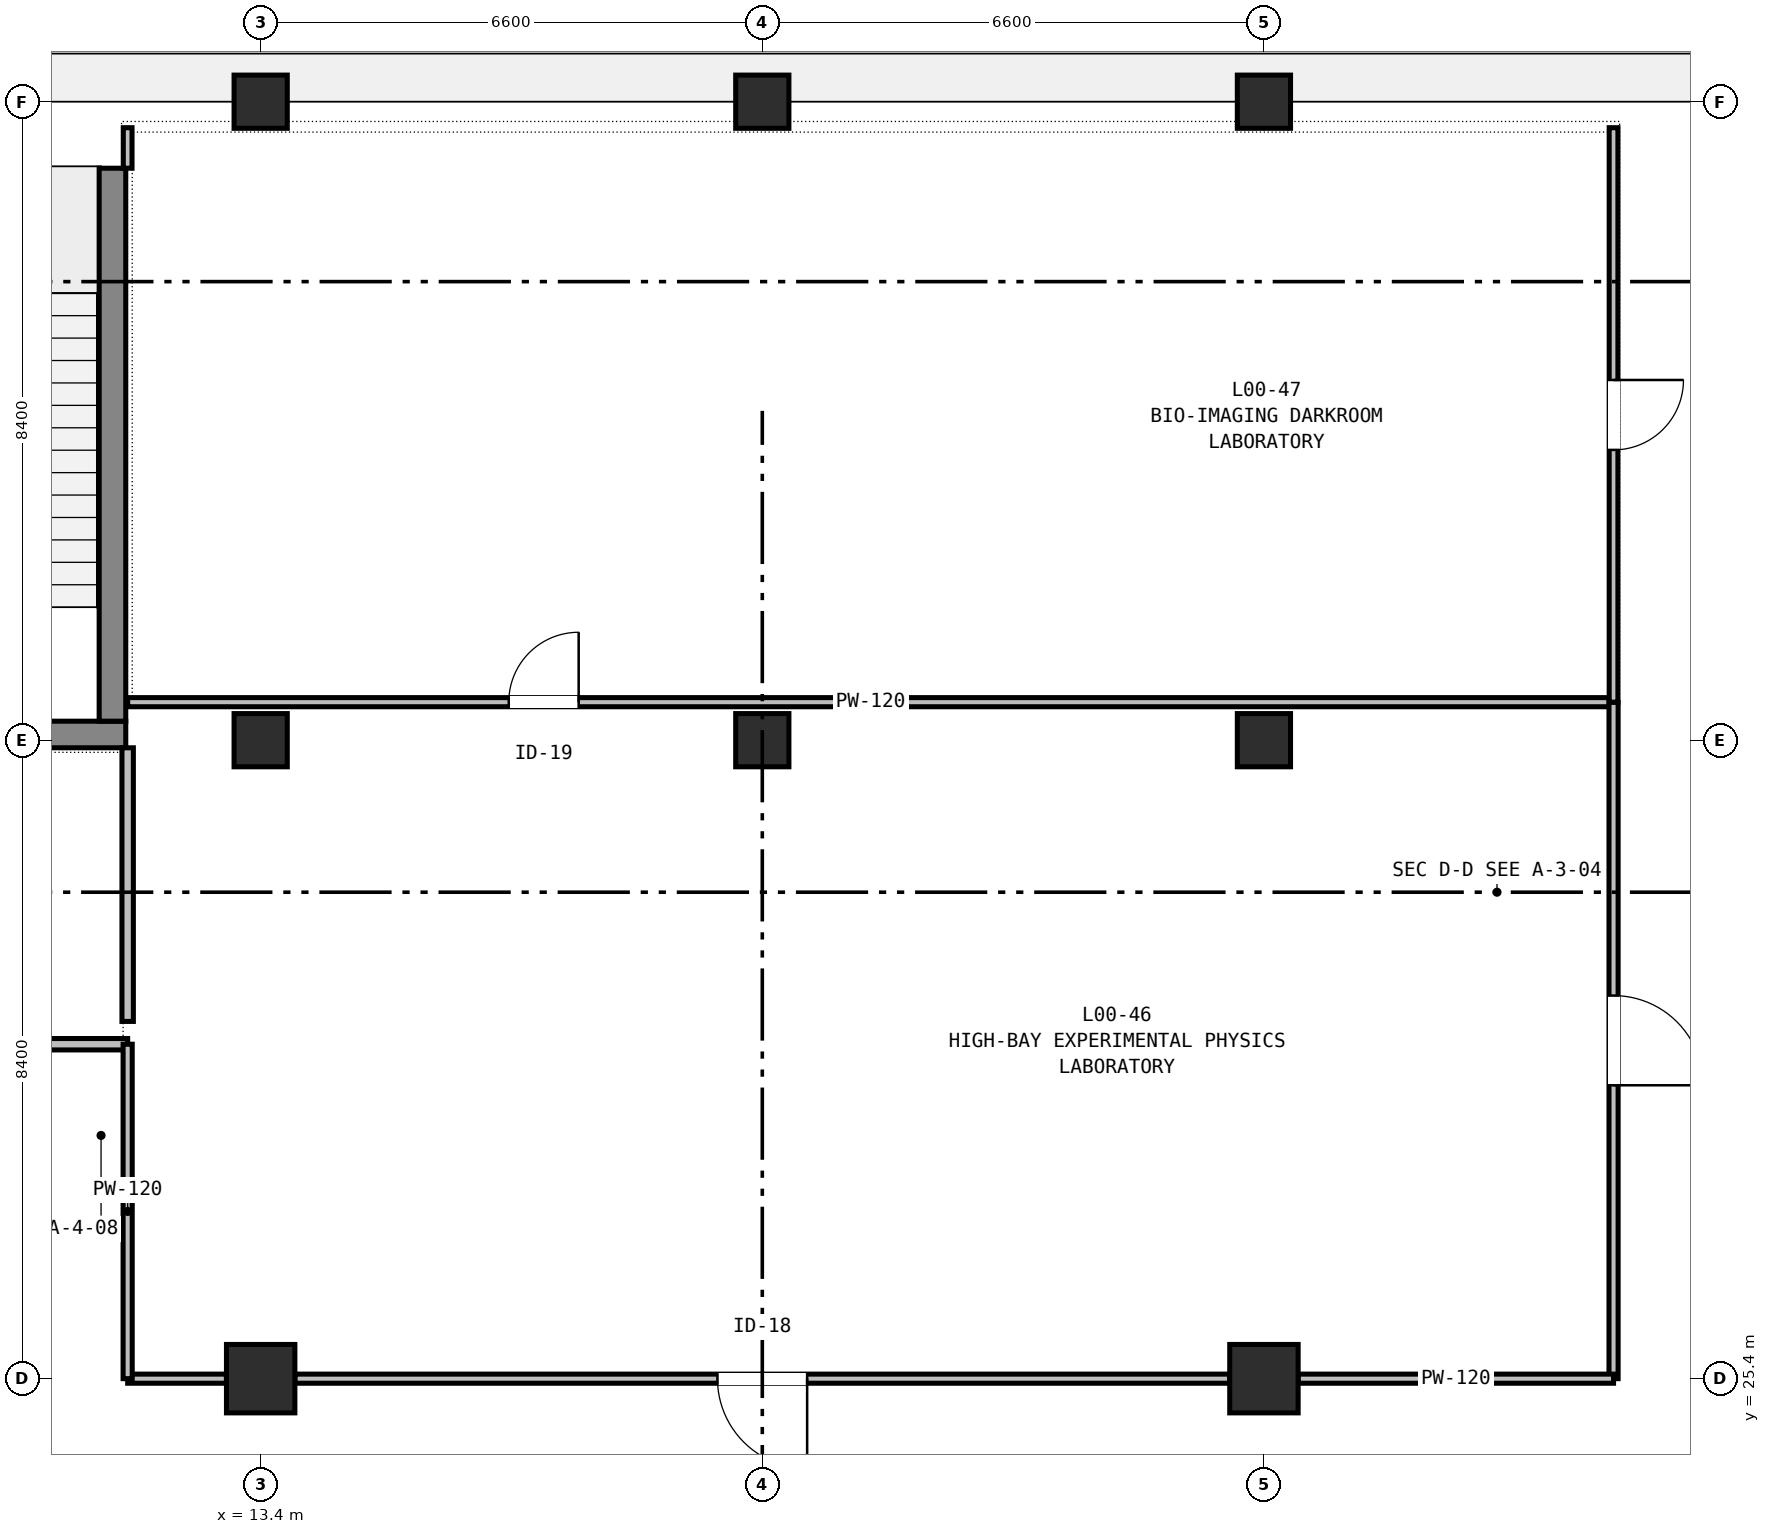
"""IFC4 building model, lengths in metres.
Left out: names, types, materials, properties, quantities, classifications, styles, units other than length and angle.
Written with IfcOpenShell. Run it as: python <this file> out.ifc"""

import sys

from ifc_helpers import new_model, si_unit, direction, frame, frame_2d, origin, origin_2d, place, context, subcontext, project, spatial, rectangle, extrude, element, fill, save


model = new_model("IFC4")
c1 = context("Model", 3, precision=1e-05, world=origin(), true_north=direction((0.0, 1.0)))
c2 = subcontext(c1, "Body", "Model", "MODEL_VIEW")
j1 = project(units=[si_unit("LENGTHUNIT", "METRE"), si_unit("PLANEANGLEUNIT", "RADIAN")], contexts=[c1])
p1 = place(None, origin())
s1 = spatial("IfcSite", under=j1, at=p1, CompositionType="ELEMENT")
p2 = place(p1, origin())
s2 = spatial("IfcBuilding", under=s1, at=p2, CompositionType="ELEMENT")
p3 = place(p2, origin())
s3 = spatial("IfcBuildingStorey", under=s2, at=p3, CompositionType="ELEMENT", Elevation=0.0)
p4 = place(p3, frame((13.4, 25.4, -0.32), z_axis=(0.0, 0.0, 1.0), x_axis=(1.0, 0.0, 0.0)))
e1 = element("IfcColumn", 1, at=p4, inside=s3, PredefinedType="COLUMN", context=c2, shape_type="SweptSolid", body=[
    extrude(rectangle(XDim=0.9, YDim=0.9, at=origin_2d()), origin(), (0.0, 0.0, 1.0), 5.72),
])
for number, where, z_axis, x_axis in (
    (2, (13.4, 33.8, -0.32), (0.0, 0.0, 1.0), (1.0, 0.0, 0.0)),
    (3, (13.4, 42.2, -0.32), (0.0, 0.0, 1.0), (1.0, 0.0, 0.0)),
    (4, (20.0, 33.8, -0.32), (0.0, 0.0, 1.0), (1.0, 0.0, 0.0)),
    (5, (20.0, 42.2, -0.32), (0.0, 0.0, 1.0), (1.0, 0.0, 0.0)),
):
    element("IfcColumn", number, at=place(p3, frame(where, z_axis=z_axis, x_axis=x_axis)), inside=s3, PredefinedType="COLUMN", context=c2, shape_type="SweptSolid", body=[
        extrude(rectangle(XDim=0.7, YDim=0.7, at=origin_2d()), origin(), (0.0, 0.0, 1.0), 5.72),
    ])
p5 = place(p3, frame((26.6, 25.4, -0.32), z_axis=(0.0, 0.0, 1.0), x_axis=(1.0, 0.0, 0.0)))
e6 = element("IfcColumn", 6, at=p5, inside=s3, PredefinedType="COLUMN", context=c2, shape_type="SweptSolid", body=[
    extrude(rectangle(XDim=0.9, YDim=0.9, at=origin_2d()), origin(), (0.0, 0.0, 1.0), 5.72),
])
for number, where, z_axis, x_axis in (
    (7, (26.6, 33.8, -0.32), (0.0, 0.0, 1.0), (1.0, 0.0, 0.0)),
    (8, (26.6, 42.2, -0.32), (0.0, 0.0, 1.0), (1.0, 0.0, 0.0)),
):
    element("IfcColumn", number, at=place(p3, frame(where, z_axis=z_axis, x_axis=x_axis)), inside=s3, PredefinedType="COLUMN", context=c2, shape_type="SweptSolid", body=[
        extrude(rectangle(XDim=0.7, YDim=0.7, at=origin_2d()), origin(), (0.0, 0.0, 1.0), 5.72),
    ])
p6 = place(p3, frame((11.625, 33.875, -0.32), z_axis=(0.0, 0.0, 1.0), x_axis=(-1.0, 0.0, 0.0)))
e9 = element("IfcWall", 9, at=p6, inside=s3, PredefinedType="SHEAR", context=c2, shape_type="SweptSolid", body=[
    extrude(rectangle(XDim=3.75, YDim=0.35, at=frame_2d((1.875, 0.0))), origin(), (0.0, 0.0, 1.0), 5.72),
])
p7 = place(p6, frame((1.3, 0.0, 0.32)))
e10 = element("IfcOpeningElement", 10, at=p7, cuts=e9, PredefinedType="OPENING", context=c2, shape_type="SweptSolid", body=[
    extrude(rectangle(XDim=1.15, YDim=2.15, at=frame_2d((0.575, 1.075))), frame((0.0, 0.185, 0.0), z_axis=(0.0, -1.0, 0.0), x_axis=(1.0, 0.0, 0.0)), (0.0, 0.0, 1.0), 0.37),
])
p8 = place(p3, frame((7.875, 41.5, -0.32), z_axis=(0.0, 0.0, 1.0), x_axis=(1.0, 0.0, 0.0)))
e11 = element("IfcWall", 11, at=p8, inside=s3, PredefinedType="SHEAR", context=c2, shape_type="SweptSolid", body=[
    extrude(rectangle(XDim=3.75, YDim=0.35, at=frame_2d((1.875, 0.0))), origin(), (0.0, 0.0, 1.0), 5.72),
])
p9 = place(p3, frame((11.45, 34.05, -0.32), z_axis=(0.0, 0.0, 1.0), x_axis=(0.0, 1.0, 0.0)))
e12 = element("IfcWall", 12, at=p9, inside=s3, PredefinedType="SHEAR", context=c2, shape_type="SweptSolid", body=[
    extrude(rectangle(XDim=7.275, YDim=0.35, at=frame_2d((3.637, 0.0))), origin(), (0.0, 0.0, 1.0), 5.72),
])
p10 = place(p3, frame((6.8, 42.03, 0.0), z_axis=(0.0, 0.0, 1.0), x_axis=(1.0, 0.0, 0.0)))
e13 = element("IfcWall", 13, at=p10, inside=s3, PredefinedType="STANDARD", context=c2, shape_type="SweptSolid", body=[
    extrude(rectangle(XDim=6.6, YDim=0.34, at=frame_2d((3.3, 0.0))), origin(), (0.0, 0.0, 1.0), 4.535),
])
p11 = place(p10, frame((1.29, 0.0, 0.9)))
e14 = element("IfcOpeningElement", 14, at=p11, cuts=e13, PredefinedType="OPENING", context=c2, shape_type="SweptSolid", body=[
    extrude(rectangle(XDim=2.35, YDim=1.5, at=frame_2d((1.175, 0.75))), frame((0.0, 0.18, 0.0), z_axis=(0.0, -1.0, 0.0), x_axis=(1.0, 0.0, 0.0)), (0.0, 0.0, 1.0), 0.36),
])
p12 = place(p3, frame((13.4, 42.03, 0.0), z_axis=(0.0, 0.0, 1.0), x_axis=(1.0, 0.0, 0.0)))
e15 = element("IfcWall", 15, at=p12, inside=s3, PredefinedType="STANDARD", context=c2, shape_type="SweptSolid", body=[
    extrude(rectangle(XDim=6.6, YDim=0.34, at=frame_2d((3.3, 0.0))), origin(), (0.0, 0.0, 1.0), 4.535),
])
p13 = place(p12, frame((2.35, 0.0, 0.0)))
e16 = element("IfcOpeningElement", 16, at=p13, cuts=e15, PredefinedType="OPENING", context=c2, shape_type="SweptSolid", body=[
    extrude(rectangle(XDim=1.9, YDim=2.3, at=frame_2d((0.95, 1.15))), frame((0.0, 0.18, 0.0), z_axis=(0.0, -1.0, 0.0), x_axis=(1.0, 0.0, 0.0)), (0.0, 0.0, 1.0), 0.36),
])
p14 = place(p3, frame((20.0, 42.03, 0.0), z_axis=(0.0, 0.0, 1.0), x_axis=(1.0, 0.0, 0.0)))
e17 = element("IfcWall", 17, at=p14, inside=s3, PredefinedType="STANDARD", context=c2, shape_type="SweptSolid", body=[
    extrude(rectangle(XDim=6.6, YDim=0.34, at=frame_2d((3.3, 0.0))), origin(), (0.0, 0.0, 1.0), 4.535),
])
p15 = place(p14, frame((2.35, 0.0, 0.0)))
e18 = element("IfcOpeningElement", 18, at=p15, cuts=e17, PredefinedType="OPENING", context=c2, shape_type="SweptSolid", body=[
    extrude(rectangle(XDim=1.9, YDim=2.3, at=frame_2d((0.95, 1.15))), frame((0.0, 0.18, 0.0), z_axis=(0.0, -1.0, 0.0), x_axis=(1.0, 0.0, 0.0)), (0.0, 0.0, 1.0), 0.36),
])
p16 = place(p3, frame((26.6, 42.03, 0.0), z_axis=(0.0, 0.0, 1.0), x_axis=(1.0, 0.0, 0.0)))
e19 = element("IfcWall", 19, at=p16, inside=s3, PredefinedType="STANDARD", context=c2, shape_type="SweptSolid", body=[
    extrude(rectangle(XDim=6.6, YDim=0.34, at=frame_2d((3.3, 0.0))), origin(), (0.0, 0.0, 1.0), 4.535),
])
p17 = place(p16, frame((0.882, 0.0, 0.75)))
e20 = element("IfcOpeningElement", 20, at=p17, cuts=e19, PredefinedType="OPENING", context=c2, shape_type="SweptSolid", body=[
    extrude(rectangle(XDim=1.8, YDim=2.4, at=frame_2d((0.9, 1.2))), frame((0.0, 0.18, 0.0), z_axis=(0.0, -1.0, 0.0), x_axis=(1.0, 0.0, 0.0)), (0.0, 0.0, 1.0), 0.36),
])
p18 = place(p3, frame((11.65, 33.7, 0.0), z_axis=(0.0, 0.0, 1.0), x_axis=(0.0, -1.0, 0.0)))
e21 = element("IfcWall", 21, at=p18, inside=s3, PredefinedType="PARTITIONING", context=c2, shape_type="SweptSolid", body=[
    extrude(rectangle(XDim=3.6, YDim=0.15, at=frame_2d((1.8, 0.0))), origin(), (0.0, 0.0, 1.0), 4.735),
])
p19 = place(p3, frame((11.65, 29.8, 0.0), z_axis=(0.0, 0.0, 1.0), x_axis=(-1.0, 0.0, 0.0)))
e22 = element("IfcWall", 22, at=p19, inside=s3, PredefinedType="PARTITIONING", context=c2, shape_type="SweptSolid", body=[
    extrude(rectangle(XDim=11.308, YDim=0.15, at=frame_2d((5.654, 0.0))), origin(), (0.0, 0.0, 1.0), 4.535),
])
p20 = place(p19, frame((1.988, 0.0, 0.0)))
e23 = element("IfcOpeningElement", 23, at=p20, cuts=e22, PredefinedType="OPENING", context=c2, shape_type="SweptSolid", body=[
    extrude(rectangle(XDim=1.0, YDim=2.1, at=frame_2d((0.5, 1.05))), frame((0.0, 0.085, 0.0), z_axis=(0.0, -1.0, 0.0), x_axis=(1.0, 0.0, 0.0)), (0.0, 0.0, 1.0), 0.17),
])
p21 = place(p3, frame((11.65, 34.3, 0.0), z_axis=(0.0, 0.0, 1.0), x_axis=(1.0, 0.0, 0.0)))
e24 = element("IfcWall", 24, at=p21, inside=s3, PredefinedType="PARTITIONING", context=c2, shape_type="SweptSolid", body=[
    extrude(rectangle(XDim=19.55, YDim=0.12, at=frame_2d((9.775, 0.0))), origin(), (0.0, 0.0, 1.0), 4.535),
])
p22 = place(p21, frame((5.014, 0.0, 0.0)))
e25 = element("IfcOpeningElement", 25, at=p22, cuts=e24, PredefinedType="OPENING", context=c2, shape_type="SweptSolid", body=[
    extrude(rectangle(XDim=0.92, YDim=2.14, at=frame_2d((0.46, 1.07))), frame((0.0, 0.07, 0.0), z_axis=(0.0, -1.0, 0.0), x_axis=(1.0, 0.0, 0.0)), (0.0, 0.0, 1.0), 0.14),
])
p23 = place(p3, frame((31.2, 34.3, 0.0), z_axis=(0.0, 0.0, 1.0), x_axis=(0.0, -1.0, 0.0)))
e26 = element("IfcWall", 26, at=p23, inside=s3, PredefinedType="PARTITIONING", context=c2, shape_type="SweptSolid", body=[
    extrude(rectangle(XDim=8.9, YDim=0.12, at=frame_2d((4.45, 0.0))), origin(), (0.0, 0.0, 1.0), 4.735),
])
p24 = place(p23, frame((3.86, 0.0, 0.0)))
e27 = element("IfcOpeningElement", 27, at=p24, cuts=e26, PredefinedType="OPENING", context=c2, shape_type="SweptSolid", body=[
    extrude(rectangle(XDim=1.18, YDim=2.1, at=frame_2d((0.59, 1.05))), frame((0.0, 0.07, 0.0), z_axis=(0.0, -1.0, 0.0), x_axis=(1.0, 0.0, 0.0)), (0.0, 0.0, 1.0), 0.14),
])
p25 = place(p3, frame((31.2, 25.4, 0.0), z_axis=(0.0, 0.0, 1.0), x_axis=(-1.0, 0.0, 0.0)))
e28 = element("IfcWall", 28, at=p25, inside=s3, PredefinedType="PARTITIONING", context=c2, shape_type="SweptSolid", body=[
    extrude(rectangle(XDim=4.15, YDim=0.12, at=frame_2d((2.075, 0.0))), origin(), (0.0, 0.0, 1.0), 4.735),
])
p26 = place(p3, frame((26.15, 25.4, 0.0), z_axis=(0.0, 0.0, 1.0), x_axis=(-1.0, 0.0, 0.0)))
e29 = element("IfcWall", 29, at=p26, inside=s3, PredefinedType="PARTITIONING", context=c2, shape_type="SweptSolid", body=[
    extrude(rectangle(XDim=12.3, YDim=0.12, at=frame_2d((6.15, 0.0))), origin(), (0.0, 0.0, 1.0), 4.435),
])
p27 = place(p26, frame((5.56, 0.0, 0.0)))
e30 = element("IfcOpeningElement", 30, at=p27, cuts=e29, PredefinedType="OPENING", context=c2, shape_type="SweptSolid", body=[
    extrude(rectangle(XDim=1.18, YDim=2.1, at=frame_2d((0.59, 1.05))), frame((0.0, 0.07, 0.0), z_axis=(0.0, -1.0, 0.0), x_axis=(1.0, 0.0, 0.0)), (0.0, 0.0, 1.0), 0.14),
])
p28 = place(p3, frame((12.95, 25.4, 0.0), z_axis=(0.0, 0.0, 1.0), x_axis=(-1.0, 0.0, 0.0)))
e31 = element("IfcWall", 31, at=p28, inside=s3, PredefinedType="PARTITIONING", context=c2, shape_type="SweptSolid", body=[
    extrude(rectangle(XDim=1.3, YDim=0.12, at=frame_2d((0.65, 0.0))), origin(), (0.0, 0.0, 1.0), 4.735),
])
p29 = place(p3, frame((11.65, 25.4, 0.0), z_axis=(0.0, 0.0, 1.0), x_axis=(0.0, 1.0, 0.0)))
e32 = element("IfcWall", 32, at=p29, inside=s3, PredefinedType="PARTITIONING", context=c2, shape_type="SweptSolid", body=[
    extrude(rectangle(XDim=4.4, YDim=0.12, at=frame_2d((2.2, 0.0))), origin(), (0.0, 0.0, 1.0), 4.735),
])
p30 = place(p3, frame((31.2, 41.858, 0.0), z_axis=(0.0, 0.0, 1.0), x_axis=(0.0, -1.0, 0.0)))
e33 = element("IfcWall", 33, at=p30, inside=s3, PredefinedType="PARTITIONING", context=c2, shape_type="SweptSolid", body=[
    extrude(rectangle(XDim=7.558, YDim=0.115, at=frame_2d((3.779, 0.0))), origin(), (0.0, 0.0, 1.0), 5.095),
])
p31 = place(p30, frame((3.319, 0.0, 0.0)))
e34 = element("IfcOpeningElement", 34, at=p31, cuts=e33, PredefinedType="OPENING", context=c2, shape_type="SweptSolid", body=[
    extrude(rectangle(XDim=0.92, YDim=2.14, at=frame_2d((0.46, 1.07))), frame((0.0, 0.067, 0.0), z_axis=(0.0, -1.0, 0.0), x_axis=(1.0, 0.0, 0.0)), (0.0, 0.0, 1.0), 0.135),
])
p32 = place(p3, frame((11.65, 41.325, 0.0), z_axis=(0.0, 0.0, 1.0), x_axis=(0.0, 1.0, 0.0)))
e35 = element("IfcWall", 35, at=p32, inside=s3, PredefinedType="PARTITIONING", context=c2, shape_type="SweptSolid", body=[
    extrude(rectangle(XDim=0.533, YDim=0.115, at=frame_2d((0.267, 0.0))), origin(), (0.0, 0.0, 1.0), 5.095),
])
p33 = place(p13, origin())
e36 = element("IfcDoor", 36, at=p33, inside=s3, OperationType="DOUBLE_DOOR_SINGLE_SWING", PredefinedType="DOOR", context=c2, shape_type="SweptSolid", body=[
    extrude(rectangle(XDim=1.9, YDim=2.3, at=frame_2d((0.95, 1.15))), frame((0.0, 0.025, 0.0), z_axis=(0.0, -1.0, 0.0), x_axis=(1.0, 0.0, 0.0)), (0.0, 0.0, 1.0), 0.05),
])
fill(e16, e36)
p34 = place(p15, origin())
e37 = element("IfcDoor", 37, at=p34, inside=s3, OperationType="DOUBLE_DOOR_SINGLE_SWING", PredefinedType="DOOR", context=c2, shape_type="SweptSolid", body=[
    extrude(rectangle(XDim=1.9, YDim=2.3, at=frame_2d((0.95, 1.15))), frame((0.0, 0.025, 0.0), z_axis=(0.0, -1.0, 0.0), x_axis=(1.0, 0.0, 0.0)), (0.0, 0.0, 1.0), 0.05),
])
fill(e18, e37)
p35 = place(p17, origin())
e38 = element("IfcWindow", 38, at=p35, inside=s3, PartitioningType="SINGLE_PANEL", PredefinedType="WINDOW", context=c2, shape_type="SweptSolid", body=[
    extrude(rectangle(XDim=1.8, YDim=2.4, at=frame_2d((0.9, 1.2))), frame((0.0, 0.03, 0.0), z_axis=(0.0, -1.0, 0.0), x_axis=(1.0, 0.0, 0.0)), (0.0, 0.0, 1.0), 0.06),
])
fill(e20, e38)
p36 = place(p27, origin())
e39 = element("IfcDoor", 39, at=p36, inside=s3, OperationType="SINGLE_SWING_LEFT", PredefinedType="DOOR", context=c2, shape_type="SweptSolid", body=[
    extrude(rectangle(XDim=1.18, YDim=2.1, at=frame_2d((0.59, 1.05))), frame((0.0, 0.025, 0.0), z_axis=(0.0, -1.0, 0.0), x_axis=(1.0, 0.0, 0.0)), (0.0, 0.0, 1.0), 0.05),
])
fill(e30, e39)
p37 = place(p24, origin())
e40 = element("IfcDoor", 40, at=p37, inside=s3, OperationType="SINGLE_SWING_RIGHT", PredefinedType="DOOR", context=c2, shape_type="SweptSolid", body=[
    extrude(rectangle(XDim=1.18, YDim=2.1, at=frame_2d((0.59, 1.05))), frame((0.0, 0.025, 0.0), z_axis=(0.0, -1.0, 0.0), x_axis=(1.0, 0.0, 0.0)), (0.0, 0.0, 1.0), 0.05),
])
fill(e27, e40)
p38 = place(p31, origin())
e41 = element("IfcDoor", 41, at=p38, inside=s3, OperationType="SINGLE_SWING_LEFT", PredefinedType="DOOR", context=c2, shape_type="SweptSolid", body=[
    extrude(rectangle(XDim=0.92, YDim=2.14, at=frame_2d((0.46, 1.07))), frame((0.0, 0.025, 0.0), z_axis=(0.0, -1.0, 0.0), x_axis=(1.0, 0.0, 0.0)), (0.0, 0.0, 1.0), 0.05),
])
fill(e34, e41)
p39 = place(p22, origin())
e42 = element("IfcDoor", 42, at=p39, inside=s3, OperationType="SINGLE_SWING_RIGHT", PredefinedType="DOOR", context=c2, shape_type="SweptSolid", body=[
    extrude(rectangle(XDim=0.92, YDim=2.14, at=frame_2d((0.46, 1.07))), frame((0.0, 0.025, 0.0), z_axis=(0.0, -1.0, 0.0), x_axis=(1.0, 0.0, 0.0)), (0.0, 0.0, 1.0), 0.05),
])
fill(e25, e42)
save(model, sys.argv[1])
